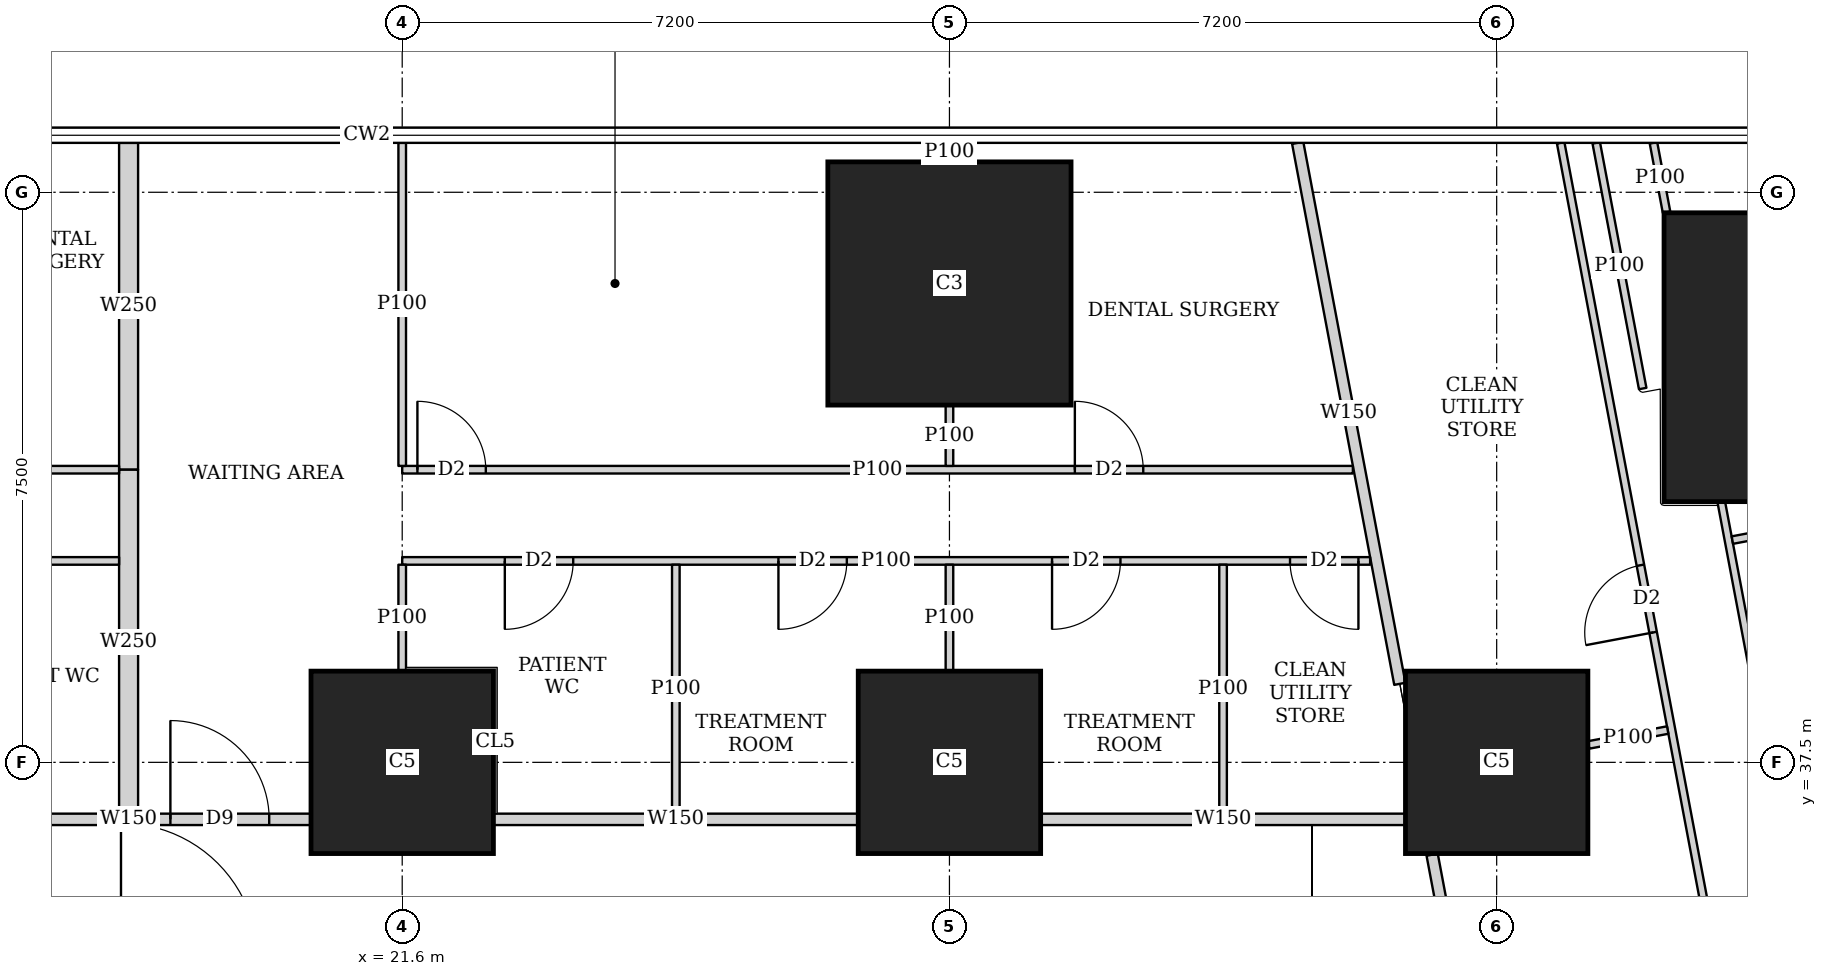
"""IFC4 building model, lengths in metres.
Left out: names, types, materials, properties, quantities, classifications, styles, units other than length and angle.
Written with IfcOpenShell. Run it as: python <this file> out.ifc"""

import sys

from ifc_helpers import new_model, si_unit, direction, frame, frame_2d, origin, origin_2d, place, context, subcontext, project, spatial, rectangle, extrude, element, fill, save


model = new_model("IFC4")
c1 = context("Model", 3, precision=1e-05, world=origin(), true_north=direction((0.0, 1.0)))
c2 = subcontext(c1, "Body", "Model", "MODEL_VIEW")
j1 = project(units=[si_unit("LENGTHUNIT", "METRE"), si_unit("PLANEANGLEUNIT", "RADIAN")], contexts=[c1])
p1 = place(None, origin())
s1 = spatial("IfcSite", under=j1, at=p1, CompositionType="ELEMENT")
p2 = place(p1, origin())
s2 = spatial("IfcBuilding", under=s1, at=p2, CompositionType="ELEMENT")
p3 = place(p2, frame((0.0, 0.0, 10.1)))
s3 = spatial("IfcBuildingStorey", under=s2, at=p3, CompositionType="ELEMENT", Elevation=10.1)
for number, where, z_axis, x_axis in (
    (1, (21.6, 37.5, 0.0), (0.0, 0.0, 1.0), (1.0, 0.0, 0.0)),
    (2, (28.8, 37.5, 0.0), (0.0, 0.0, 1.0), (1.0, 0.0, 0.0)),
    (3, (36.0, 37.5, 0.0), (0.0, 0.0, 1.0), (1.0, 0.0, 0.0)),
):
    element("IfcColumn", number, at=place(p3, frame(where, z_axis=z_axis, x_axis=x_axis)), inside=s3, PredefinedType="COLUMN", context=c2, shape_type="SweptSolid", body=[
        extrude(rectangle(XDim=2.4, YDim=2.4, at=origin_2d()), origin(), (0.0, 0.0, 1.0), 4.5),
    ])
p4 = place(p3, frame((40.102, 42.83, 0.0), z_axis=(0.0, 0.0, 1.0), x_axis=(1.0, 0.0, 0.0)))
e4 = element("IfcColumn", 4, at=p4, inside=s3, PredefinedType="COLUMN", context=c2, shape_type="SweptSolid", body=[
    extrude(rectangle(XDim=3.8, YDim=3.8, at=origin_2d()), origin(), (0.0, 0.0, 1.0), 4.5),
])
p5 = place(p3, frame((28.8, 43.8, 0.0), z_axis=(0.0, 0.0, 1.0), x_axis=(1.0, 0.0, 0.0)))
e5 = element("IfcColumn", 5, at=p5, inside=s3, PredefinedType="COLUMN", context=c2, shape_type="SweptSolid", body=[
    extrude(rectangle(XDim=3.2, YDim=3.2, at=origin_2d()), origin(), (0.0, 0.0, 1.0), 4.5),
])
p6 = place(p3, frame((15.601, 36.75, 0.0), z_axis=(0.0, 0.0, 1.0), x_axis=(1.0, 0.0, 0.0)))
e6 = element("IfcWall", 6, at=p6, inside=s3, PredefinedType="SOLIDWALL", context=c2, shape_type="SweptSolid", body=[
    extrude(rectangle(XDim=4.798, YDim=0.15, at=frame_2d((2.399, 0.0))), origin(), (0.0, 0.0, 1.0), 2.6),
])
p7 = place(p6, frame((2.949, 0.0, 0.0)))
e7 = element("IfcOpeningElement", 7, at=p7, cuts=e6, PredefinedType="OPENING", context=c2, shape_type="SweptSolid", body=[
    extrude(rectangle(XDim=1.3, YDim=2.1, at=frame_2d((0.65, 1.05))), frame((0.0, 0.085, 0.0), z_axis=(0.0, -1.0, 0.0), x_axis=(1.0, 0.0, 0.0)), (0.0, 0.0, 1.0), 0.17),
])
for number, where, z_axis, x_axis in (
    (8, (22.801, 36.75, 0.0), (0.0, 0.0, 1.0), (1.0, 0.0, 0.0)),
    (9, (30.001, 36.75, 0.0), (0.0, 0.0, 1.0), (1.0, 0.0, 0.0)),
):
    element("IfcWall", number, at=place(p3, frame(where, z_axis=z_axis, x_axis=x_axis)), inside=s3, PredefinedType="SOLIDWALL", context=c2, shape_type="SweptSolid", body=[
        extrude(rectangle(XDim=4.798, YDim=0.15, at=frame_2d((2.399, 0.0))), origin(), (0.0, 0.0, 1.0), 2.6),
    ])
p8 = place(p3, frame((33.382, 45.65, 0.0), z_axis=(0.0, 0.0, 1.0), x_axis=(0.185564463355, -0.982632092871, 0.0)))
e10 = element("IfcWall", 10, at=p8, inside=s3, PredefinedType="SOLIDWALL", context=c2, shape_type="SweptSolid", body=[
    extrude(rectangle(XDim=7.243, YDim=0.15, at=frame_2d((3.621, 0.0))), origin(), (0.0, 0.0, 1.0), 2.4),
])
p9 = place(p3, frame((35.151, 36.285, 0.0), z_axis=(0.0, 0.0, 1.0), x_axis=(0.18558085056, -0.982628998099, 0.0)))
e11 = element("IfcWall", 11, at=p9, inside=s3, PredefinedType="SOLIDWALL", context=c2, shape_type="SweptSolid", body=[
    extrude(rectangle(XDim=34.352, YDim=0.15, at=frame_2d((17.176, 0.0))), origin(), (0.0, 0.0, 1.0), 2.4),
])
p10 = place(p9, frame((13.189, 0.0, 0.0)))
e12 = element("IfcOpeningElement", 12, at=p10, cuts=e11, PredefinedType="OPENING", context=c2, shape_type="SweptSolid", body=[
    extrude(rectangle(XDim=1.3, YDim=2.1, at=frame_2d((0.65, 1.05))), frame((0.0, 0.085, 0.0), z_axis=(0.0, -1.0, 0.0), x_axis=(1.0, 0.0, 0.0)), (0.0, 0.0, 1.0), 0.17),
])
p11 = place(p9, frame((19.443, 0.0, 0.0)))
e13 = element("IfcOpeningElement", 13, at=p11, cuts=e11, PredefinedType="OPENING", context=c2, shape_type="SweptSolid", body=[
    extrude(rectangle(XDim=1.3, YDim=2.1, at=frame_2d((0.65, 1.05))), frame((0.0, 0.085, 0.0), z_axis=(0.0, -1.0, 0.0), x_axis=(1.0, 0.0, 0.0)), (0.0, 0.0, 1.0), 0.17),
])
p12 = place(p9, frame((25.444, 0.0, 0.0)))
e14 = element("IfcOpeningElement", 14, at=p12, cuts=e11, PredefinedType="OPENING", context=c2, shape_type="SweptSolid", body=[
    extrude(rectangle(XDim=1.3, YDim=2.1, at=frame_2d((0.65, 1.05))), frame((0.0, 0.085, 0.0), z_axis=(0.0, -1.0, 0.0), x_axis=(1.0, 0.0, 0.0)), (0.0, 0.0, 1.0), 0.17),
])
p13 = place(p3, frame((37.921, 42.418, 0.0), z_axis=(0.0, 0.0, 1.0), x_axis=(-0.185713480744, 0.982603940085, 0.0)))
e15 = element("IfcWall", 15, at=p13, inside=s3, PredefinedType="PARTITIONING", context=c2, shape_type="SweptSolid", body=[
    extrude(rectangle(XDim=3.289, YDim=0.1, at=frame_2d((1.645, 0.0))), origin(), (0.0, 0.0, 1.0), 2.4),
])
p14 = place(p3, frame((38.063, 45.65, 0.0), z_axis=(0.0, 0.0, 1.0), x_axis=(0.185288147753, -0.982684233262, 0.0)))
e16 = element("IfcWall", 16, at=p14, inside=s3, PredefinedType="PARTITIONING", context=c2, shape_type="SweptSolid", body=[
    extrude(rectangle(XDim=0.929, YDim=0.1, at=frame_2d((0.464, 0.0))), origin(), (0.0, 0.0, 1.0), 4.2),
])
p15 = place(p3, frame((38.956, 40.92, 0.0), z_axis=(0.0, 0.0, 1.0), x_axis=(0.185636914727, -0.982618408077, 0.0)))
e17 = element("IfcWall", 17, at=p15, inside=s3, PredefinedType="PARTITIONING", context=c2, shape_type="SweptSolid", body=[
    extrude(rectangle(XDim=15.729, YDim=0.1, at=frame_2d((7.865, 0.0))), origin(), (0.0, 0.0, 1.0), 2.6),
])
p16 = place(p15, frame((14.679, 0.0, 0.0)))
e18 = element("IfcOpeningElement", 18, at=p16, cuts=e17, PredefinedType="OPENING", context=c2, shape_type="SweptSolid", body=[
    extrude(rectangle(XDim=0.9, YDim=2.1, at=frame_2d((0.45, 1.05))), frame((0.0, 0.06, 0.0), z_axis=(0.0, -1.0, 0.0), x_axis=(1.0, 0.0, 0.0)), (0.0, 0.0, 1.0), 0.12),
])
p17 = place(p15, frame((9.0, 0.0, 0.0)))
e19 = element("IfcOpeningElement", 19, at=p17, cuts=e17, PredefinedType="OPENING", context=c2, shape_type="SweptSolid", body=[
    extrude(rectangle(XDim=0.9, YDim=2.1, at=frame_2d((0.45, 1.05))), frame((0.0, 0.06, 0.0), z_axis=(0.0, -1.0, 0.0), x_axis=(1.0, 0.0, 0.0)), (0.0, 0.0, 1.0), 0.12),
])
p18 = place(p15, frame((3.231, 0.0, 0.0)))
e20 = element("IfcOpeningElement", 20, at=p18, cuts=e17, PredefinedType="OPENING", context=c2, shape_type="SweptSolid", body=[
    extrude(rectangle(XDim=0.9, YDim=2.1, at=frame_2d((0.45, 1.05))), frame((0.0, 0.06, 0.0), z_axis=(0.0, -1.0, 0.0), x_axis=(1.0, 0.0, 0.0)), (0.0, 0.0, 1.0), 0.12),
])
p19 = place(p3, frame((36.842, 45.65, 0.0), z_axis=(0.0, 0.0, 1.0), x_axis=(0.185559483963, -0.982633033188, 0.0)))
e21 = element("IfcWall", 21, at=p19, inside=s3, PredefinedType="PARTITIONING", context=c2, shape_type="SweptSolid", body=[
    extrude(rectangle(XDim=20.77, YDim=0.1, at=frame_2d((10.385, 0.0))), origin(), (0.0, 0.0, 1.0), 2.4),
])
p20 = place(p19, frame((18.462, 0.0, 0.0)))
e22 = element("IfcOpeningElement", 22, at=p20, cuts=e21, PredefinedType="OPENING", context=c2, shape_type="SweptSolid", body=[
    extrude(rectangle(XDim=0.9, YDim=2.1, at=frame_2d((0.45, 1.05))), frame((0.0, 0.06, 0.0), z_axis=(0.0, -1.0, 0.0), x_axis=(1.0, 0.0, 0.0)), (0.0, 0.0, 1.0), 0.12),
])
p21 = place(p19, frame((14.645, 0.0, 0.0)))
e23 = element("IfcOpeningElement", 23, at=p21, cuts=e21, PredefinedType="OPENING", context=c2, shape_type="SweptSolid", body=[
    extrude(rectangle(XDim=0.9, YDim=2.1, at=frame_2d((0.45, 1.05))), frame((0.0, 0.06, 0.0), z_axis=(0.0, -1.0, 0.0), x_axis=(1.0, 0.0, 0.0)), (0.0, 0.0, 1.0), 0.12),
])
p22 = place(p19, frame((5.655, 0.0, 0.0)))
e24 = element("IfcOpeningElement", 24, at=p22, cuts=e21, PredefinedType="OPENING", context=c2, shape_type="SweptSolid", body=[
    extrude(rectangle(XDim=0.9, YDim=2.1, at=frame_2d((0.45, 1.05))), frame((0.0, 0.06, 0.0), z_axis=(0.0, -1.0, 0.0), x_axis=(1.0, 0.0, 0.0)), (0.0, 0.0, 1.0), 0.12),
])
p23 = place(p3, frame((41.521, 40.881, 0.0), z_axis=(0.0, 0.0, 1.0), x_axis=(-0.982628922785, -0.18558124934, 0.0)))
e25 = element("IfcWall", 25, at=p23, inside=s3, PredefinedType="PARTITIONING", context=c2, shape_type="SweptSolid", body=[
    extrude(rectangle(XDim=2.463, YDim=0.1, at=frame_2d((1.231, 0.0))), origin(), (0.0, 0.0, 1.0), 2.4),
])
p24 = place(p3, frame((38.25, 37.925, 0.0), z_axis=(0.0, 0.0, 1.0), x_axis=(-0.982694151031, -0.185235540676, 0.0)))
e26 = element("IfcWall", 26, at=p24, inside=s3, PredefinedType="PARTITIONING", context=c2, shape_type="SweptSolid", body=[
    extrude(rectangle(XDim=1.058, YDim=0.1, at=frame_2d((0.529, 0.0))), origin(), (0.0, 0.0, 1.0), 4.2),
])
p25 = place(p3, frame((14.4, 41.35, 0.0), z_axis=(0.0, 0.0, 1.0), x_axis=(1.0, 0.0, 0.0)))
e27 = element("IfcWall", 27, at=p25, inside=s3, PredefinedType="PARTITIONING", context=c2, shape_type="SweptSolid", body=[
    extrude(rectangle(XDim=3.475, YDim=0.1, at=frame_2d((1.738, 0.0))), origin(), (0.0, 0.0, 1.0), 2.6),
])
p26 = place(p25, frame((1.65, 0.0, 0.0)))
e28 = element("IfcOpeningElement", 28, at=p26, cuts=e27, PredefinedType="OPENING", context=c2, shape_type="SweptSolid", body=[
    extrude(rectangle(XDim=0.9, YDim=2.1, at=frame_2d((0.45, 1.05))), frame((0.0, 0.06, 0.0), z_axis=(0.0, -1.0, 0.0), x_axis=(1.0, 0.0, 0.0)), (0.0, 0.0, 1.0), 0.12),
])
p27 = place(p3, frame((14.4, 40.15, 0.0), z_axis=(0.0, 0.0, 1.0), x_axis=(1.0, 0.0, 0.0)))
e29 = element("IfcWall", 29, at=p27, inside=s3, PredefinedType="PARTITIONING", context=c2, shape_type="SweptSolid", body=[
    extrude(rectangle(XDim=3.475, YDim=0.1, at=frame_2d((1.738, 0.0))), origin(), (0.0, 0.0, 1.0), 2.6),
])
p28 = place(p27, frame((1.35, 0.0, 0.0)))
e30 = element("IfcOpeningElement", 30, at=p28, cuts=e29, PredefinedType="OPENING", context=c2, shape_type="SweptSolid", body=[
    extrude(rectangle(XDim=0.9, YDim=2.1, at=frame_2d((0.45, 1.05))), frame((0.0, 0.06, 0.0), z_axis=(0.0, -1.0, 0.0), x_axis=(1.0, 0.0, 0.0)), (0.0, 0.0, 1.0), 0.12),
])
p29 = place(p3, frame((21.6, 41.35, 0.0), z_axis=(0.0, 0.0, 1.0), x_axis=(1.0, 0.0, 0.0)))
e31 = element("IfcWall", 31, at=p29, inside=s3, PredefinedType="PARTITIONING", context=c2, shape_type="SweptSolid", body=[
    extrude(rectangle(XDim=12.508, YDim=0.1, at=frame_2d((6.254, 0.0))), origin(), (0.0, 0.0, 1.0), 2.6),
])
p30 = place(p29, frame((0.2, 0.0, 0.0)))
e32 = element("IfcOpeningElement", 32, at=p30, cuts=e31, PredefinedType="OPENING", context=c2, shape_type="SweptSolid", body=[
    extrude(rectangle(XDim=0.9, YDim=2.1, at=frame_2d((0.45, 1.05))), frame((0.0, 0.06, 0.0), z_axis=(0.0, -1.0, 0.0), x_axis=(1.0, 0.0, 0.0)), (0.0, 0.0, 1.0), 0.12),
])
p31 = place(p29, frame((8.85, 0.0, 0.0)))
e33 = element("IfcOpeningElement", 33, at=p31, cuts=e31, PredefinedType="OPENING", context=c2, shape_type="SweptSolid", body=[
    extrude(rectangle(XDim=0.9, YDim=2.1, at=frame_2d((0.45, 1.05))), frame((0.0, 0.06, 0.0), z_axis=(0.0, -1.0, 0.0), x_axis=(1.0, 0.0, 0.0)), (0.0, 0.0, 1.0), 0.12),
])
p32 = place(p3, frame((21.6, 40.15, 0.0), z_axis=(0.0, 0.0, 1.0), x_axis=(1.0, 0.0, 0.0)))
e34 = element("IfcWall", 34, at=p32, inside=s3, PredefinedType="PARTITIONING", context=c2, shape_type="SweptSolid", body=[
    extrude(rectangle(XDim=12.735, YDim=0.1, at=frame_2d((6.367, 0.0))), origin(), (0.0, 0.0, 1.0), 2.6),
])
p33 = place(p32, frame((1.35, 0.0, 0.0)))
e35 = element("IfcOpeningElement", 35, at=p33, cuts=e34, PredefinedType="OPENING", context=c2, shape_type="SweptSolid", body=[
    extrude(rectangle(XDim=0.9, YDim=2.1, at=frame_2d((0.45, 1.05))), frame((0.0, 0.06, 0.0), z_axis=(0.0, -1.0, 0.0), x_axis=(1.0, 0.0, 0.0)), (0.0, 0.0, 1.0), 0.12),
])
p34 = place(p32, frame((4.95, 0.0, 0.0)))
e36 = element("IfcOpeningElement", 36, at=p34, cuts=e34, PredefinedType="OPENING", context=c2, shape_type="SweptSolid", body=[
    extrude(rectangle(XDim=0.9, YDim=2.1, at=frame_2d((0.45, 1.05))), frame((0.0, 0.06, 0.0), z_axis=(0.0, -1.0, 0.0), x_axis=(1.0, 0.0, 0.0)), (0.0, 0.0, 1.0), 0.12),
])
p35 = place(p32, frame((8.55, 0.0, 0.0)))
e37 = element("IfcOpeningElement", 37, at=p35, cuts=e34, PredefinedType="OPENING", context=c2, shape_type="SweptSolid", body=[
    extrude(rectangle(XDim=0.9, YDim=2.1, at=frame_2d((0.45, 1.05))), frame((0.0, 0.06, 0.0), z_axis=(0.0, -1.0, 0.0), x_axis=(1.0, 0.0, 0.0)), (0.0, 0.0, 1.0), 0.12),
])
p36 = place(p32, frame((11.681, 0.0, 0.0)))
e38 = element("IfcOpeningElement", 38, at=p36, cuts=e34, PredefinedType="OPENING", context=c2, shape_type="SweptSolid", body=[
    extrude(rectangle(XDim=0.9, YDim=2.1, at=frame_2d((0.45, 1.05))), frame((0.0, 0.06, 0.0), z_axis=(0.0, -1.0, 0.0), x_axis=(1.0, 0.0, 0.0)), (0.0, 0.0, 1.0), 0.12),
])
p37 = place(p3, frame((21.6, 41.4, 0.0), z_axis=(0.0, 0.0, 1.0), x_axis=(0.0, 1.0, 0.0)))
e39 = element("IfcWall", 39, at=p37, inside=s3, PredefinedType="PARTITIONING", context=c2, shape_type="SweptSolid", body=[
    extrude(rectangle(XDim=4.25, YDim=0.1, at=frame_2d((2.125, 0.0))), origin(), (0.0, 0.0, 1.0), 2.4),
])
p38 = place(p3, frame((28.8, 41.4, 0.0), z_axis=(0.0, 0.0, 1.0), x_axis=(0.0, 1.0, 0.0)))
e40 = element("IfcWall", 40, at=p38, inside=s3, PredefinedType="PARTITIONING", context=c2, shape_type="SweptSolid", body=[
    extrude(rectangle(XDim=0.799, YDim=0.1, at=frame_2d((0.399, 0.0))), origin(), (0.0, 0.0, 1.0), 2.6),
])
p39 = place(p3, frame((28.8, 45.401, 0.0), z_axis=(0.0, 0.0, 1.0), x_axis=(0.0, 1.0, 0.0)))
e41 = element("IfcWall", 41, at=p39, inside=s3, PredefinedType="PARTITIONING", context=c2, shape_type="SweptSolid", body=[
    extrude(rectangle(XDim=0.249, YDim=0.1, at=frame_2d((0.125, 0.0))), origin(), (0.0, 0.0, 1.0), 4.2),
])
p40 = place(p3, frame((21.6, 38.701, 0.0), z_axis=(0.0, 0.0, 1.0), x_axis=(0.0, 1.0, 0.0)))
e42 = element("IfcWall", 42, at=p40, inside=s3, PredefinedType="PARTITIONING", context=c2, shape_type="SweptSolid", body=[
    extrude(rectangle(XDim=1.399, YDim=0.1, at=frame_2d((0.7, 0.0))), origin(), (0.0, 0.0, 1.0), 4.2),
])
p41 = place(p3, frame((25.2, 36.825, 0.0), z_axis=(0.0, 0.0, 1.0), x_axis=(0.0, 1.0, 0.0)))
e43 = element("IfcWall", 43, at=p41, inside=s3, PredefinedType="PARTITIONING", context=c2, shape_type="SweptSolid", body=[
    extrude(rectangle(XDim=3.275, YDim=0.1, at=frame_2d((1.638, 0.0))), origin(), (0.0, 0.0, 1.0), 2.6),
])
p42 = place(p3, frame((28.8, 38.701, 0.0), z_axis=(0.0, 0.0, 1.0), x_axis=(0.0, 1.0, 0.0)))
e44 = element("IfcWall", 44, at=p42, inside=s3, PredefinedType="PARTITIONING", context=c2, shape_type="SweptSolid", body=[
    extrude(rectangle(XDim=1.399, YDim=0.1, at=frame_2d((0.7, 0.0))), origin(), (0.0, 0.0, 1.0), 2.6),
])
p43 = place(p3, frame((32.4, 36.825, 0.0), z_axis=(0.0, 0.0, 1.0), x_axis=(0.0, 1.0, 0.0)))
e45 = element("IfcWall", 45, at=p43, inside=s3, PredefinedType="PARTITIONING", context=c2, shape_type="SweptSolid", body=[
    extrude(rectangle(XDim=3.275, YDim=0.1, at=frame_2d((1.638, 0.0))), origin(), (0.0, 0.0, 1.0), 2.6),
])
p44 = place(p3, frame((18.0, 41.35, 0.0), z_axis=(0.0, 0.0, 1.0), x_axis=(0.0, 1.0, 0.0)))
e46 = element("IfcWall", 46, at=p44, inside=s3, PredefinedType="SOLIDWALL", context=c2, shape_type="SweptSolid", body=[
    extrude(rectangle(XDim=4.3, YDim=0.25, at=frame_2d((2.15, 0.0))), origin(), (0.0, 0.0, 1.0), 2.4),
])
p45 = place(p3, frame((18.0, 36.825, 0.0), z_axis=(0.0, 0.0, 1.0), x_axis=(0.0, 1.0, 0.0)))
e47 = element("IfcWall", 47, at=p45, inside=s3, PredefinedType="SOLIDWALL", context=c2, shape_type="SweptSolid", body=[
    extrude(rectangle(XDim=4.525, YDim=0.25, at=frame_2d((2.263, 0.0))), origin(), (0.0, 0.0, 1.0), 2.6),
])
p46 = place(p22, origin())
e48 = element("IfcDoor", 48, at=p46, inside=s3, OperationType="SINGLE_SWING_LEFT", PredefinedType="DOOR", context=c2, shape_type="SweptSolid", body=[
    extrude(rectangle(XDim=0.9, YDim=2.1, at=frame_2d((0.45, 1.05))), frame((0.0, 0.025, 0.0), z_axis=(0.0, -1.0, 0.0), x_axis=(1.0, 0.0, 0.0)), (0.0, 0.0, 1.0), 0.05),
])
fill(e24, e48)
p47 = place(p30, origin())
e49 = element("IfcDoor", 49, at=p47, inside=s3, OperationType="SINGLE_SWING_LEFT", PredefinedType="DOOR", context=c2, shape_type="SweptSolid", body=[
    extrude(rectangle(XDim=0.9, YDim=2.1, at=frame_2d((0.45, 1.05))), frame((0.0, 0.025, 0.0), z_axis=(0.0, -1.0, 0.0), x_axis=(1.0, 0.0, 0.0)), (0.0, 0.0, 1.0), 0.05),
])
fill(e32, e49)
p48 = place(p31, origin())
e50 = element("IfcDoor", 50, at=p48, inside=s3, OperationType="SINGLE_SWING_LEFT", PredefinedType="DOOR", context=c2, shape_type="SweptSolid", body=[
    extrude(rectangle(XDim=0.9, YDim=2.1, at=frame_2d((0.45, 1.05))), frame((0.0, 0.025, 0.0), z_axis=(0.0, -1.0, 0.0), x_axis=(1.0, 0.0, 0.0)), (0.0, 0.0, 1.0), 0.05),
])
fill(e33, e50)
p49 = place(p33, origin())
e51 = element("IfcDoor", 51, at=p49, inside=s3, OperationType="SINGLE_SWING_RIGHT", PredefinedType="DOOR", context=c2, shape_type="SweptSolid", body=[
    extrude(rectangle(XDim=0.9, YDim=2.1, at=frame_2d((0.45, 1.05))), frame((0.0, 0.025, 0.0), z_axis=(0.0, -1.0, 0.0), x_axis=(1.0, 0.0, 0.0)), (0.0, 0.0, 1.0), 0.05),
])
fill(e35, e51)
p50 = place(p34, origin())
e52 = element("IfcDoor", 52, at=p50, inside=s3, OperationType="SINGLE_SWING_RIGHT", PredefinedType="DOOR", context=c2, shape_type="SweptSolid", body=[
    extrude(rectangle(XDim=0.9, YDim=2.1, at=frame_2d((0.45, 1.05))), frame((0.0, 0.025, 0.0), z_axis=(0.0, -1.0, 0.0), x_axis=(1.0, 0.0, 0.0)), (0.0, 0.0, 1.0), 0.05),
])
fill(e36, e52)
p51 = place(p35, origin())
e53 = element("IfcDoor", 53, at=p51, inside=s3, OperationType="SINGLE_SWING_RIGHT", PredefinedType="DOOR", context=c2, shape_type="SweptSolid", body=[
    extrude(rectangle(XDim=0.9, YDim=2.1, at=frame_2d((0.45, 1.05))), frame((0.0, 0.025, 0.0), z_axis=(0.0, -1.0, 0.0), x_axis=(1.0, 0.0, 0.0)), (0.0, 0.0, 1.0), 0.05),
])
fill(e37, e53)
p52 = place(p36, origin())
e54 = element("IfcDoor", 54, at=p52, inside=s3, OperationType="SINGLE_SWING_LEFT", PredefinedType="DOOR", context=c2, shape_type="SweptSolid", body=[
    extrude(rectangle(XDim=0.9, YDim=2.1, at=frame_2d((0.45, 1.05))), frame((0.0, 0.025, 0.0), z_axis=(0.0, -1.0, 0.0), x_axis=(1.0, 0.0, 0.0)), (0.0, 0.0, 1.0), 0.05),
])
fill(e38, e54)
p53 = place(p7, origin())
e55 = element("IfcDoor", 55, at=p53, inside=s3, OperationType="DOUBLE_DOOR_SINGLE_SWING", PredefinedType="DOOR", context=c2, shape_type="SweptSolid", body=[
    extrude(rectangle(XDim=1.3, YDim=2.1, at=frame_2d((0.65, 1.05))), frame((0.0, 0.025, 0.0), z_axis=(0.0, -1.0, 0.0), x_axis=(1.0, 0.0, 0.0)), (0.0, 0.0, 1.0), 0.05),
])
fill(e7, e55)
save(model, sys.argv[1])
